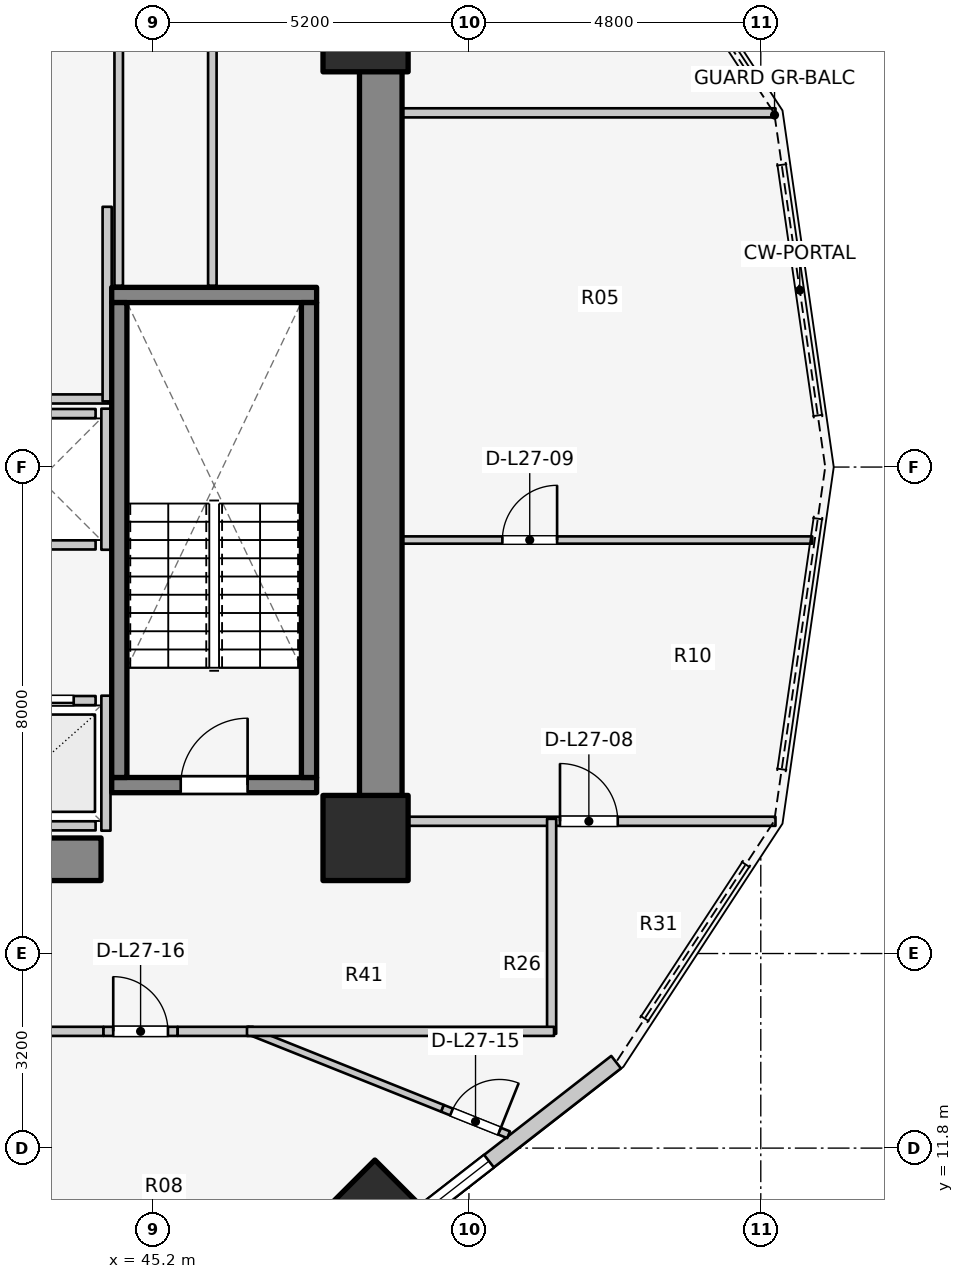
"""IFC4 building model, lengths in metres.
Left out: names, types, materials, properties, quantities, classifications, styles, units other than length and angle.
Written with IfcOpenShell. Run it as: python <this file> out.ifc"""

import sys

from ifc_helpers import new_model, si_unit, direction, frame, frame_2d, origin, origin_2d, place, context, subcontext, project, spatial, rectangle, extrude, element, fill, save


model = new_model("IFC4")
c1 = context("Model", 3, precision=1e-05, world=origin(), true_north=direction((0.0, 1.0)))
c2 = subcontext(c1, "Body", "Model", "MODEL_VIEW")
j1 = project(units=[si_unit("LENGTHUNIT", "METRE"), si_unit("PLANEANGLEUNIT", "RADIAN")], contexts=[c1])
p1 = place(None, origin())
s1 = spatial("IfcSite", under=j1, at=p1, CompositionType="ELEMENT")
p2 = place(p1, origin())
s2 = spatial("IfcBuilding", under=s1, at=p2, CompositionType="ELEMENT")
p3 = place(p2, frame((0.0, 0.0, 91.8)))
s3 = spatial("IfcBuildingStorey", under=s2, at=p3, CompositionType="ELEMENT", Elevation=91.8)
p4 = place(p3, frame((48.95, 17.05, 0.0), z_axis=(0.0, 0.0, 1.0), x_axis=(0.0, 1.0, 0.0)))
e1 = element("IfcWall", 1, at=p4, inside=s3, PredefinedType="SHEAR", context=c2, shape_type="SweptSolid", body=[
    extrude(rectangle(XDim=12.8, YDim=0.7, at=frame_2d((6.4, 0.0))), origin(), (0.0, 0.0, 1.0), 3.1),
])
p5 = place(p3, frame((39.85, 16.55, 0.0), z_axis=(0.0, 0.0, 1.0), x_axis=(1.0, 0.0, 0.0)))
e2 = element("IfcWall", 2, at=p5, inside=s3, PredefinedType="SHEAR", context=c2, shape_type="SweptSolid", body=[
    extrude(rectangle(XDim=4.5, YDim=0.7, at=frame_2d((2.25, 0.0))), origin(), (0.0, 0.0, 1.0), 3.1),
])
p6 = place(p3, frame((44.525, 17.77, 0.0), z_axis=(0.0, 0.0, 1.0), x_axis=(1.0, 0.0, 0.0)))
e3 = element("IfcWall", 3, at=p6, inside=s3, PredefinedType="SOLIDWALL", context=c2, shape_type="SweptSolid", body=[
    extrude(rectangle(XDim=3.37, YDim=0.25, at=frame_2d((1.685, 0.0))), origin(), (0.0, 0.0, 1.0), 3.1),
])
p7 = place(p6, frame((1.135, 0.0, 0.0)))
e4 = element("IfcOpeningElement", 4, at=p7, cuts=e3, PredefinedType="OPENING", context=c2, shape_type="SweptSolid", body=[
    extrude(rectangle(XDim=1.1, YDim=2.1, at=frame_2d((0.55, 1.05))), frame((0.0, 0.135, 0.0), z_axis=(0.0, -1.0, 0.0), x_axis=(1.0, 0.0, 0.0)), (0.0, 0.0, 1.0), 0.27),
])
p8 = place(p3, frame((44.525, 25.83, 0.0), z_axis=(0.0, 0.0, 1.0), x_axis=(1.0, 0.0, 0.0)))
e5 = element("IfcWall", 5, at=p8, inside=s3, PredefinedType="SOLIDWALL", context=c2, shape_type="SweptSolid", body=[
    extrude(rectangle(XDim=3.37, YDim=0.25, at=frame_2d((1.685, 0.0))), origin(), (0.0, 0.0, 1.0), 3.1),
])
for number, where, z_axis, x_axis in (
    (6, (44.65, 17.895, 0.0), (0.0, 0.0, 1.0), (0.0, 1.0, 0.0)),
    (7, (47.77, 17.895, 0.0), (0.0, 0.0, 1.0), (0.0, 1.0, 0.0)),
):
    element("IfcWall", number, at=place(p3, frame(where, z_axis=z_axis, x_axis=x_axis)), inside=s3, PredefinedType="SOLIDWALL", context=c2, shape_type="SweptSolid", body=[
        extrude(rectangle(XDim=7.81, YDim=0.25, at=frame_2d((3.905, 0.0))), origin(), (0.0, 0.0, 1.0), 3.1),
    ])
for number, where, z_axis, x_axis in (
    (8, (48.7, 16.9, 0.0), (0.0, 0.0, 1.0), (1.0, 0.0, 0.0)),
    (9, (48.7, 30.2, 0.0), (0.0, 0.0, 1.0), (1.0, 0.0, 0.0)),
):
    element("IfcColumn", number, at=place(p3, frame(where, z_axis=z_axis, x_axis=x_axis)), inside=s3, PredefinedType="COLUMN", context=c2, shape_type="SweptSolid", body=[
        extrude(rectangle(XDim=1.4, YDim=1.4, at=origin_2d()), origin(), (0.0, 0.0, 1.0), 3.1),
    ])
p9 = place(p3, frame((48.853, 10.862, 0.0), z_axis=(0.0, 0.0, 1.0), x_axis=(0.707106781187, -0.707106781187, 0.0)))
e10 = element("IfcColumn", 10, at=p9, inside=s3, PredefinedType="COLUMN", context=c2, shape_type="SweptSolid", body=[
    extrude(rectangle(XDim=1.05, YDim=1.05, at=origin_2d()), origin(), (0.0, 0.0, 1.0), 3.1),
])
p10 = place(p3, frame((49.266, 10.447, 0.0), z_axis=(0.0, 0.0, 1.0), x_axis=(0.789127449954, 0.614229491094, 0.0)))
e11 = element("IfcWall", 11, at=p10, inside=s3, PredefinedType="STANDARD", context=c2, shape_type="SweptSolid", body=[
    extrude(rectangle(XDim=4.505, YDim=0.26, at=frame_2d((2.252, 0.0))), origin(), (0.0, 0.0, 1.0), 1.22),
])
p11 = place(p10, frame((0.655, 0.0, 0.15)))
e12 = element("IfcOpeningElement", 12, at=p11, cuts=e11, PredefinedType="OPENING", context=c2, shape_type="SweptSolid", body=[
    extrude(rectangle(XDim=1.2, YDim=0.9, at=frame_2d((0.6, 0.45))), frame((0.0, 0.14, 0.0), z_axis=(0.0, -1.0, 0.0), x_axis=(1.0, 0.0, 0.0)), (0.0, 0.0, 1.0), 0.28),
])
p12 = place(p3, frame((42.44, 19.16, 0.0), z_axis=(0.0, 0.0, 1.0), x_axis=(1.0, 0.0, 0.0)))
e13 = element("IfcWall", 13, at=p12, inside=s3, PredefinedType="SOLIDWALL", context=c2, shape_type="SweptSolid", body=[
    extrude(rectangle(XDim=1.82, YDim=0.15, at=frame_2d((0.91, 0.0))), origin(), (0.0, 0.0, 1.0), 2.575),
])
p13 = place(p12, frame((0.36, 0.0, 0.0)))
e14 = element("IfcOpeningElement", 14, at=p13, cuts=e13, PredefinedType="OPENING", context=c2, shape_type="SweptSolid", body=[
    extrude(rectangle(XDim=1.1, YDim=2.1, at=frame_2d((0.55, 1.05))), frame((0.0, 0.085, 0.0), z_axis=(0.0, -1.0, 0.0), x_axis=(1.0, 0.0, 0.0)), (0.0, 0.0, 1.0), 0.17),
])
p14 = place(p3, frame((42.44, 17.1, 0.0), z_axis=(0.0, 0.0, 1.0), x_axis=(1.0, 0.0, 0.0)))
e15 = element("IfcWall", 15, at=p14, inside=s3, PredefinedType="SOLIDWALL", context=c2, shape_type="SweptSolid", body=[
    extrude(rectangle(XDim=1.82, YDim=0.15, at=frame_2d((0.91, 0.0))), origin(), (0.0, 0.0, 1.0), 2.575),
])
p15 = place(p3, frame((44.43, 17.02, 0.0), z_axis=(0.0, 0.0, 1.0), x_axis=(0.0, 1.0, 0.0)))
e16 = element("IfcWall", 16, at=p15, inside=s3, PredefinedType="SOLIDWALL", context=c2, shape_type="SweptSolid", body=[
    extrude(rectangle(XDim=2.22, YDim=0.15, at=frame_2d((1.11, 0.0))), origin(), (0.0, 0.0, 1.0), 2.12),
])
for number, where, z_axis, x_axis in (
    (17, (42.44, 21.72, 0.0), (0.0, 0.0, 1.0), (1.0, 0.0, 0.0)),
    (18, (42.44, 23.88, 0.0), (0.0, 0.0, 1.0), (1.0, 0.0, 0.0)),
):
    element("IfcWall", number, at=place(p3, frame(where, z_axis=z_axis, x_axis=x_axis)), inside=s3, PredefinedType="SOLIDWALL", context=c2, shape_type="SweptSolid", body=[
        extrude(rectangle(XDim=1.82, YDim=0.15, at=frame_2d((0.91, 0.0))), origin(), (0.0, 0.0, 1.0), 2.575),
    ])
p16 = place(p3, frame((44.43, 21.64, 0.0), z_axis=(0.0, 0.0, 1.0), x_axis=(0.0, 1.0, 0.0)))
e19 = element("IfcWall", 19, at=p16, inside=s3, PredefinedType="SOLIDWALL", context=c2, shape_type="SweptSolid", body=[
    extrude(rectangle(XDim=2.32, YDim=0.15, at=frame_2d((1.16, 0.0))), origin(), (0.0, 0.0, 1.0), 2.575),
])
p17 = place(p3, frame((39.4, 24.12, 0.0), z_axis=(0.0, 0.0, 1.0), x_axis=(1.0, 0.0, 0.0)))
e20 = element("IfcWall", 20, at=p17, inside=s3, PredefinedType="PARTITIONING", context=c2, shape_type="SweptSolid", body=[
    extrude(rectangle(XDim=5.08, YDim=0.15, at=frame_2d((2.54, 0.0))), origin(), (0.0, 0.0, 1.0), 2.12),
])
p18 = place(p3, frame((44.45, 24.08, 0.0), z_axis=(0.0, 0.0, 1.0), x_axis=(0.0, 1.0, 0.0)))
e21 = element("IfcWall", 21, at=p18, inside=s3, PredefinedType="PARTITIONING", context=c2, shape_type="SweptSolid", body=[
    extrude(rectangle(XDim=3.2, YDim=0.15, at=frame_2d((1.6, 0.0))), origin(), (0.0, 0.0, 1.0), 2.575),
])
for number, where, z_axis, x_axis in (
    (22, (44.64, 25.98, 0.0), (0.0, 0.0, 1.0), (0.0, 1.0, 0.0)),
    (23, (46.18, 25.98, 0.0), (0.0, 0.0, 1.0), (0.0, 1.0, 0.0)),
):
    element("IfcWall", number, at=place(p3, frame(where, z_axis=z_axis, x_axis=x_axis)), inside=s3, PredefinedType="PLUMBINGWALL", context=c2, shape_type="SweptSolid", body=[
        extrude(rectangle(XDim=3.88, YDim=0.14, at=frame_2d((1.94, 0.0))), origin(), (0.0, 0.0, 1.0), 2.575),
    ])
p19 = place(p3, frame((48.95, 17.175, 0.0), z_axis=(0.0, 0.0, 1.0), x_axis=(1.0, 0.0, 0.0)))
e24 = element("IfcWall", 24, at=p19, inside=s3, PredefinedType="PARTITIONING", context=c2, shape_type="SweptSolid", body=[
    extrude(rectangle(XDim=6.492, YDim=0.15, at=frame_2d((3.246, 0.0))), origin(), (0.0, 0.0, 1.0), 2.575),
])
p20 = place(p19, frame((2.948, 0.0, 0.0)))
e25 = element("IfcOpeningElement", 25, at=p20, cuts=e24, PredefinedType="OPENING", context=c2, shape_type="SweptSolid", body=[
    extrude(rectangle(XDim=0.95, YDim=2.1, at=frame_2d((0.475, 1.05))), frame((0.0, 0.085, 0.0), z_axis=(0.0, -1.0, 0.0), x_axis=(1.0, 0.0, 0.0)), (0.0, 0.0, 1.0), 0.17),
])
p21 = place(p3, frame((48.95, 28.825, 0.0), z_axis=(0.0, 0.0, 1.0), x_axis=(1.0, 0.0, 0.0)))
e26 = element("IfcWall", 26, at=p21, inside=s3, PredefinedType="PARTITIONING", context=c2, shape_type="SweptSolid", body=[
    extrude(rectangle(XDim=6.492, YDim=0.15, at=frame_2d((3.246, 0.0))), origin(), (0.0, 0.0, 1.0), 2.575),
])
p22 = place(p3, frame((48.95, 21.8, 0.0), z_axis=(0.0, 0.0, 1.0), x_axis=(1.0, 0.0, 0.0)))
e27 = element("IfcWall", 27, at=p22, inside=s3, PredefinedType="MOVABLE", context=c2, shape_type="SweptSolid", body=[
    extrude(rectangle(XDim=7.097, YDim=0.12, at=frame_2d((3.549, 0.0))), origin(), (0.0, 0.0, 1.0), 2.575),
])
p23 = place(p22, frame((2.0, 0.0, 0.0)))
e28 = element("IfcOpeningElement", 28, at=p23, cuts=e27, PredefinedType="OPENING", context=c2, shape_type="SweptSolid", body=[
    extrude(rectangle(XDim=0.9, YDim=2.1, at=frame_2d((0.45, 1.05))), frame((0.0, 0.07, 0.0), z_axis=(0.0, -1.0, 0.0), x_axis=(1.0, 0.0, 0.0)), (0.0, 0.0, 1.0), 0.14),
])
p24 = place(p3, frame((48.95, 29.8, 0.0), z_axis=(0.0, 0.0, 1.0), x_axis=(0.0, 1.0, 0.0)))
e29 = element("IfcWall", 29, at=p24, inside=s3, PredefinedType="PARTITIONING", context=c2, shape_type="SweptSolid", body=[
    extrude(rectangle(XDim=1.29, YDim=0.15, at=frame_2d((0.645, 0.0))), origin(), (0.0, 0.0, 1.0), 1.22),
])
p25 = place(p3, frame((51.76, 13.68, 0.0), z_axis=(0.0, 0.0, 1.0), x_axis=(0.0, 1.0, 0.0)))
e30 = element("IfcWall", 30, at=p25, inside=s3, PredefinedType="PARTITIONING", context=c2, shape_type="SweptSolid", body=[
    extrude(rectangle(XDim=3.535, YDim=0.15, at=frame_2d((1.768, 0.0))), origin(), (0.0, 0.0, 1.0), 2.575),
])
p26 = place(p3, frame((46.754, 13.739, 0.0), z_axis=(0.0, 0.0, 1.0), x_axis=(0.928501027376, -0.371329829345, 0.0)))
e31 = element("IfcWall", 31, at=p26, inside=s3, PredefinedType="MOVABLE", context=c2, shape_type="SweptSolid", body=[
    extrude(rectangle(XDim=3.459, YDim=0.12, at=frame_2d((1.729, 0.0))), origin(), (0.0, 0.0, 1.0), 1.22),
])
p27 = place(p3, frame((49.965, 12.454, 0.0), z_axis=(0.0, 0.0, 1.0), x_axis=(0.928548626085, -0.371210787822, 0.0)))
e32 = element("IfcWall", 32, at=p27, inside=s3, PredefinedType="MOVABLE", context=c2, shape_type="SweptSolid", body=[
    extrude(rectangle(XDim=1.17, YDim=0.12, at=frame_2d((0.585, 0.0))), origin(), (0.0, 0.0, 1.0), 2.575),
])
p28 = place(p27, frame((0.16, 0.0, 0.0)))
e33 = element("IfcOpeningElement", 33, at=p28, cuts=e32, PredefinedType="OPENING", context=c2, shape_type="SweptSolid", body=[
    extrude(rectangle(XDim=0.85, YDim=2.05, at=frame_2d((0.425, 1.025))), frame((0.0, 0.07, 0.0), z_axis=(0.0, -1.0, 0.0), x_axis=(1.0, 0.0, 0.0)), (0.0, 0.0, 1.0), 0.14),
])
p29 = place(p3, frame((39.33, 13.72, 0.0), z_axis=(0.0, 0.0, 1.0), x_axis=(1.0, 0.0, 0.0)))
e34 = element("IfcWall", 34, at=p29, inside=s3, PredefinedType="PARTITIONING", context=c2, shape_type="SweptSolid", body=[
    extrude(rectangle(XDim=5.06, YDim=0.15, at=frame_2d((2.53, 0.0))), origin(), (0.0, 0.0, 1.0), 1.22),
])
p30 = place(p3, frame((44.39, 13.72, 0.0), z_axis=(0.0, 0.0, 1.0), x_axis=(1.0, 0.0, 0.0)))
e35 = element("IfcWall", 35, at=p30, inside=s3, PredefinedType="PARTITIONING", context=c2, shape_type="SweptSolid", body=[
    extrude(rectangle(XDim=1.22, YDim=0.15, at=frame_2d((0.61, 0.0))), origin(), (0.0, 0.0, 1.0), 2.16),
])
p31 = place(p30, frame((0.16, 0.0, 0.0)))
e36 = element("IfcOpeningElement", 36, at=p31, cuts=e35, PredefinedType="OPENING", context=c2, shape_type="SweptSolid", body=[
    extrude(rectangle(XDim=0.9, YDim=2.1, at=frame_2d((0.45, 1.05))), frame((0.0, 0.085, 0.0), z_axis=(0.0, -1.0, 0.0), x_axis=(1.0, 0.0, 0.0)), (0.0, 0.0, 1.0), 0.17),
])
p32 = place(p3, frame((45.61, 13.72, 0.0), z_axis=(0.0, 0.0, 1.0), x_axis=(1.0, 0.0, 0.0)))
e37 = element("IfcWall", 37, at=p32, inside=s3, PredefinedType="PARTITIONING", context=c2, shape_type="SweptSolid", body=[
    extrude(rectangle(XDim=1.24, YDim=0.15, at=frame_2d((0.62, 0.0))), origin(), (0.0, 0.0, 1.0), 2.575),
])
p33 = place(p3, frame((46.75, 13.72, 0.0), z_axis=(0.0, 0.0, 1.0), x_axis=(1.0, 0.0, 0.0)))
e38 = element("IfcWall", 38, at=p33, inside=s3, PredefinedType="PARTITIONING", context=c2, shape_type="SweptSolid", body=[
    extrude(rectangle(XDim=5.05, YDim=0.15, at=frame_2d((2.525, 0.0))), origin(), (0.0, 0.0, 1.0), 1.22),
])
p34 = place(p3, frame((37.254, 13.093, 0.0), z_axis=(0.0, 0.0, 1.0), x_axis=(0.884730147854, -0.466103599512, 0.0)))
e39 = element("IfcWall", 39, at=p34, inside=s3, PredefinedType="PARTITIONING", context=c2, shape_type="SweptSolid", body=[
    extrude(rectangle(XDim=8.31, YDim=0.18, at=frame_2d((4.155, 0.0))), origin(), (0.0, 0.0, 1.0), 1.22),
])
p35 = place(p11, origin())
e40 = element("IfcWindow", 40, at=p35, inside=s3, PartitioningType="SINGLE_PANEL", PredefinedType="WINDOW", context=c2, shape_type="SweptSolid", body=[
    extrude(rectangle(XDim=1.2, YDim=0.9, at=frame_2d((0.6, 0.45))), frame((0.0, 0.03, 0.0), z_axis=(0.0, -1.0, 0.0), x_axis=(1.0, 0.0, 0.0)), (0.0, 0.0, 1.0), 0.06),
])
fill(e12, e40)
p36 = place(p7, origin())
e41 = element("IfcDoor", 41, at=p36, inside=s3, OperationType="SINGLE_SWING_RIGHT", PredefinedType="DOOR", context=c2, shape_type="SweptSolid", body=[
    extrude(rectangle(XDim=1.1, YDim=2.1, at=frame_2d((0.55, 1.05))), frame((0.0, 0.025, 0.0), z_axis=(0.0, -1.0, 0.0), x_axis=(1.0, 0.0, 0.0)), (0.0, 0.0, 1.0), 0.05),
])
fill(e4, e41)
p37 = place(p13, origin())
e42 = element("IfcDoor", 42, at=p37, inside=s3, OperationType="DOUBLE_DOOR_SLIDING", PredefinedType="DOOR", context=c2, shape_type="SweptSolid", body=[
    extrude(rectangle(XDim=1.1, YDim=2.1, at=frame_2d((0.55, 1.05))), frame((0.0, 0.025, 0.0), z_axis=(0.0, -1.0, 0.0), x_axis=(1.0, 0.0, 0.0)), (0.0, 0.0, 1.0), 0.05),
])
fill(e14, e42)
p38 = place(p20, origin())
e43 = element("IfcDoor", 43, at=p38, inside=s3, OperationType="SINGLE_SWING_LEFT", PredefinedType="DOOR", context=c2, shape_type="SweptSolid", body=[
    extrude(rectangle(XDim=0.95, YDim=2.1, at=frame_2d((0.475, 1.05))), frame((0.0, 0.025, 0.0), z_axis=(0.0, -1.0, 0.0), x_axis=(1.0, 0.0, 0.0)), (0.0, 0.0, 1.0), 0.05),
])
fill(e25, e43)
p39 = place(p23, origin())
e44 = element("IfcDoor", 44, at=p39, inside=s3, OperationType="SINGLE_SWING_RIGHT", PredefinedType="DOOR", context=c2, shape_type="SweptSolid", body=[
    extrude(rectangle(XDim=0.9, YDim=2.1, at=frame_2d((0.45, 1.05))), frame((0.0, 0.025, 0.0), z_axis=(0.0, -1.0, 0.0), x_axis=(1.0, 0.0, 0.0)), (0.0, 0.0, 1.0), 0.05),
])
fill(e28, e44)
p40 = place(p28, origin())
e45 = element("IfcDoor", 45, at=p40, inside=s3, OperationType="SINGLE_SWING_RIGHT", PredefinedType="DOOR", context=c2, shape_type="SweptSolid", body=[
    extrude(rectangle(XDim=0.85, YDim=2.05, at=frame_2d((0.425, 1.025))), frame((0.0, 0.025, 0.0), z_axis=(0.0, -1.0, 0.0), x_axis=(1.0, 0.0, 0.0)), (0.0, 0.0, 1.0), 0.05),
])
fill(e33, e45)
p41 = place(p31, origin())
e46 = element("IfcDoor", 46, at=p41, inside=s3, OperationType="SINGLE_SWING_LEFT", PredefinedType="DOOR", context=c2, shape_type="SweptSolid", body=[
    extrude(rectangle(XDim=0.9, YDim=2.1, at=frame_2d((0.45, 1.05))), frame((0.0, 0.025, 0.0), z_axis=(0.0, -1.0, 0.0), x_axis=(1.0, 0.0, 0.0)), (0.0, 0.0, 1.0), 0.05),
])
fill(e36, e46)
save(model, sys.argv[1])
